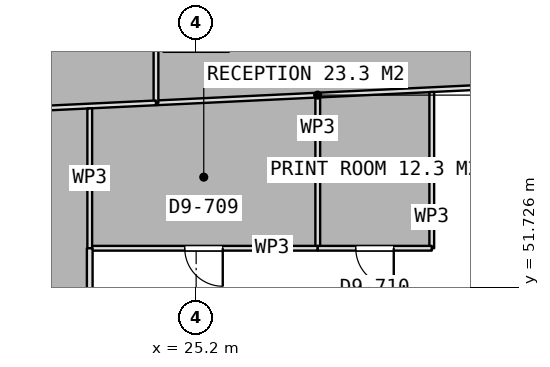
"""IFC4 building model, lengths in metres.
Left out: names, types, materials, properties, quantities, classifications, styles, units other than length and angle.
Written with IfcOpenShell. Run it as: python <this file> out.ifc"""

import sys

from ifc_helpers import new_model, si_unit, direction, frame, frame_2d, origin, place, context, subcontext, project, spatial, rectangle, extrude, element, fill, save


model = new_model("IFC4")
c1 = context("Model", 3, precision=1e-05, world=origin(), true_north=direction((0.0, 1.0)))
c2 = subcontext(c1, "Body", "Model", "MODEL_VIEW")
j1 = project(units=[si_unit("LENGTHUNIT", "METRE"), si_unit("PLANEANGLEUNIT", "RADIAN")], contexts=[c1])
p1 = place(None, origin())
s1 = spatial("IfcSite", under=j1, at=p1, CompositionType="ELEMENT")
p2 = place(p1, origin())
s2 = spatial("IfcBuilding", under=s1, at=p2, CompositionType="ELEMENT")
p3 = place(p2, frame((0.0, 0.0, 180.2)))
s3 = spatial("IfcBuildingStorey", under=s2, at=p3, CompositionType="ELEMENT", Elevation=180.2)
p4 = place(p3, frame((32.649, 56.983, 0.0), z_axis=(0.0, 0.0, 1.0), x_axis=(-0.998857279552, -0.047792625861, 0.0)))
e1 = element("IfcWall", 1, at=p4, inside=s3, PredefinedType="PARTITIONING", context=c2, shape_type="SweptSolid", body=[
    extrude(rectangle(XDim=8.516, YDim=0.125, at=frame_2d((4.258, 0.0))), origin(), (0.0, 0.0, 1.0), 3.5),
])
p5 = place(p3, frame((24.143, 56.576, 0.0), z_axis=(0.0, 0.0, 1.0), x_axis=(0.0, 1.0, 0.0)))
e2 = element("IfcWall", 2, at=p5, inside=s3, PredefinedType="PARTITIONING", context=c2, shape_type="SweptSolid", body=[
    extrude(rectangle(XDim=4.455, YDim=0.125, at=frame_2d((2.228, 0.0))), origin(), (0.0, 0.0, 1.0), 3.5),
])
p6 = place(p3, frame((24.142, 56.576, 0.0), z_axis=(0.0, 0.0, 1.0), x_axis=(-0.998859773086, -0.047740482938, 0.0)))
e3 = element("IfcWall", 3, at=p6, inside=s3, PredefinedType="PARTITIONING", context=c2, shape_type="SweptSolid", body=[
    extrude(rectangle(XDim=8.336, YDim=0.125, at=frame_2d((4.168, 0.0))), origin(), (0.0, 0.0, 1.0), 3.5),
])
p7 = place(p6, frame((3.668, 0.0, 0.0)))
e4 = element("IfcOpeningElement", 4, at=p7, cuts=e3, PredefinedType="OPENING", context=c2, shape_type="SweptSolid", body=[
    extrude(rectangle(XDim=1.0, YDim=2.1, at=frame_2d((0.5, 1.05))), frame((0.0, 0.073, 0.0), z_axis=(0.0, -1.0, 0.0), x_axis=(1.0, 0.0, 0.0)), (0.0, 0.0, 1.0), 0.145),
])
p8 = place(p3, frame((28.4, 56.717, 0.0), z_axis=(0.0, 0.0, 1.0), x_axis=(0.0, -1.0, 0.0)))
e5 = element("IfcWall", 5, at=p8, inside=s3, PredefinedType="PARTITIONING", context=c2, shape_type="SweptSolid", body=[
    extrude(rectangle(XDim=3.967, YDim=0.125, at=frame_2d((1.983, 0.0))), origin(), (0.0, 0.0, 1.0), 3.5),
])
p9 = place(p3, frame((28.4, 52.75, 0.0), z_axis=(0.0, 0.0, 1.0), x_axis=(-1.0, 0.0, 0.0)))
e6 = element("IfcWall", 6, at=p9, inside=s3, PredefinedType="PARTITIONING", context=c2, shape_type="SweptSolid", body=[
    extrude(rectangle(XDim=6.0, YDim=0.125, at=frame_2d((3.0, 0.0))), origin(), (0.0, 0.0, 1.0), 3.5),
])
p10 = place(p9, frame((2.5, 0.0, 0.0)))
e7 = element("IfcOpeningElement", 7, at=p10, cuts=e6, PredefinedType="OPENING", context=c2, shape_type="SweptSolid", body=[
    extrude(rectangle(XDim=1.0, YDim=2.1, at=frame_2d((0.5, 1.05))), frame((0.0, 0.073, 0.0), z_axis=(0.0, -1.0, 0.0), x_axis=(1.0, 0.0, 0.0)), (0.0, 0.0, 1.0), 0.145),
])
p11 = place(p3, frame((22.4, 52.75, 0.0), z_axis=(0.0, 0.0, 1.0), x_axis=(0.0, 1.0, 0.0)))
e8 = element("IfcWall", 8, at=p11, inside=s3, PredefinedType="PARTITIONING", context=c2, shape_type="SweptSolid", body=[
    extrude(rectangle(XDim=3.68, YDim=0.125, at=frame_2d((1.84, 0.0))), origin(), (0.0, 0.0, 1.0), 3.5),
])
p12 = place(p3, frame((31.4, 56.861, 0.0), z_axis=(0.0, 0.0, 1.0), x_axis=(0.0, -1.0, 0.0)))
e9 = element("IfcWall", 9, at=p12, inside=s3, PredefinedType="PARTITIONING", context=c2, shape_type="SweptSolid", body=[
    extrude(rectangle(XDim=4.111, YDim=0.125, at=frame_2d((2.056, 0.0))), origin(), (0.0, 0.0, 1.0), 3.5),
])
p13 = place(p3, frame((31.4, 52.75, 0.0), z_axis=(0.0, 0.0, 1.0), x_axis=(-1.0, 0.0, 0.0)))
e10 = element("IfcWall", 10, at=p13, inside=s3, PredefinedType="PARTITIONING", context=c2, shape_type="SweptSolid", body=[
    extrude(rectangle(XDim=3.0, YDim=0.125, at=frame_2d((1.5, 0.0))), origin(), (0.0, 0.0, 1.0), 3.5),
])
p14 = place(p13, frame((1.0, 0.0, 0.0)))
e11 = element("IfcOpeningElement", 11, at=p14, cuts=e10, PredefinedType="OPENING", context=c2, shape_type="SweptSolid", body=[
    extrude(rectangle(XDim=1.0, YDim=2.1, at=frame_2d((0.5, 1.05))), frame((0.0, 0.073, 0.0), z_axis=(0.0, -1.0, 0.0), x_axis=(1.0, 0.0, 0.0)), (0.0, 0.0, 1.0), 0.145),
])
p15 = place(p3, frame((22.4, 52.75, 0.0), z_axis=(0.0, 0.0, 1.0), x_axis=(0.0, -1.0, 0.0)))
e12 = element("IfcWall", 12, at=p15, inside=s3, PredefinedType="PARTITIONING", context=c2, shape_type="SweptSolid", body=[
    extrude(rectangle(XDim=24.675, YDim=0.15, at=frame_2d((12.337, 0.0))), origin(), (0.0, 0.0, 1.0), 3.5),
])
p16 = place(p15, frame((11.875, 0.0, 0.0)))
e13 = element("IfcOpeningElement", 13, at=p16, cuts=e12, PredefinedType="OPENING", context=c2, shape_type="SweptSolid", body=[
    extrude(rectangle(XDim=1.0, YDim=2.1, at=frame_2d((0.5, 1.05))), frame((0.0, 0.085, 0.0), z_axis=(0.0, -1.0, 0.0), x_axis=(1.0, 0.0, 0.0)), (0.0, 0.0, 1.0), 0.17),
])
p17 = place(p10, origin())
e14 = element("IfcDoor", 14, at=p17, inside=s3, OperationType="SINGLE_SWING_LEFT", PredefinedType="DOOR", context=c2, shape_type="SweptSolid", body=[
    extrude(rectangle(XDim=1.0, YDim=2.1, at=frame_2d((0.5, 1.05))), frame((0.0, 0.025, 0.0), z_axis=(0.0, -1.0, 0.0), x_axis=(1.0, 0.0, 0.0)), (0.0, 0.0, 1.0), 0.05),
])
fill(e7, e14)
p18 = place(p14, origin())
e15 = element("IfcDoor", 15, at=p18, inside=s3, OperationType="SINGLE_SWING_LEFT", PredefinedType="DOOR", context=c2, shape_type="SweptSolid", body=[
    extrude(rectangle(XDim=1.0, YDim=2.1, at=frame_2d((0.5, 1.05))), frame((0.0, 0.025, 0.0), z_axis=(0.0, -1.0, 0.0), x_axis=(1.0, 0.0, 0.0)), (0.0, 0.0, 1.0), 0.05),
])
fill(e11, e15)
save(model, sys.argv[1])
